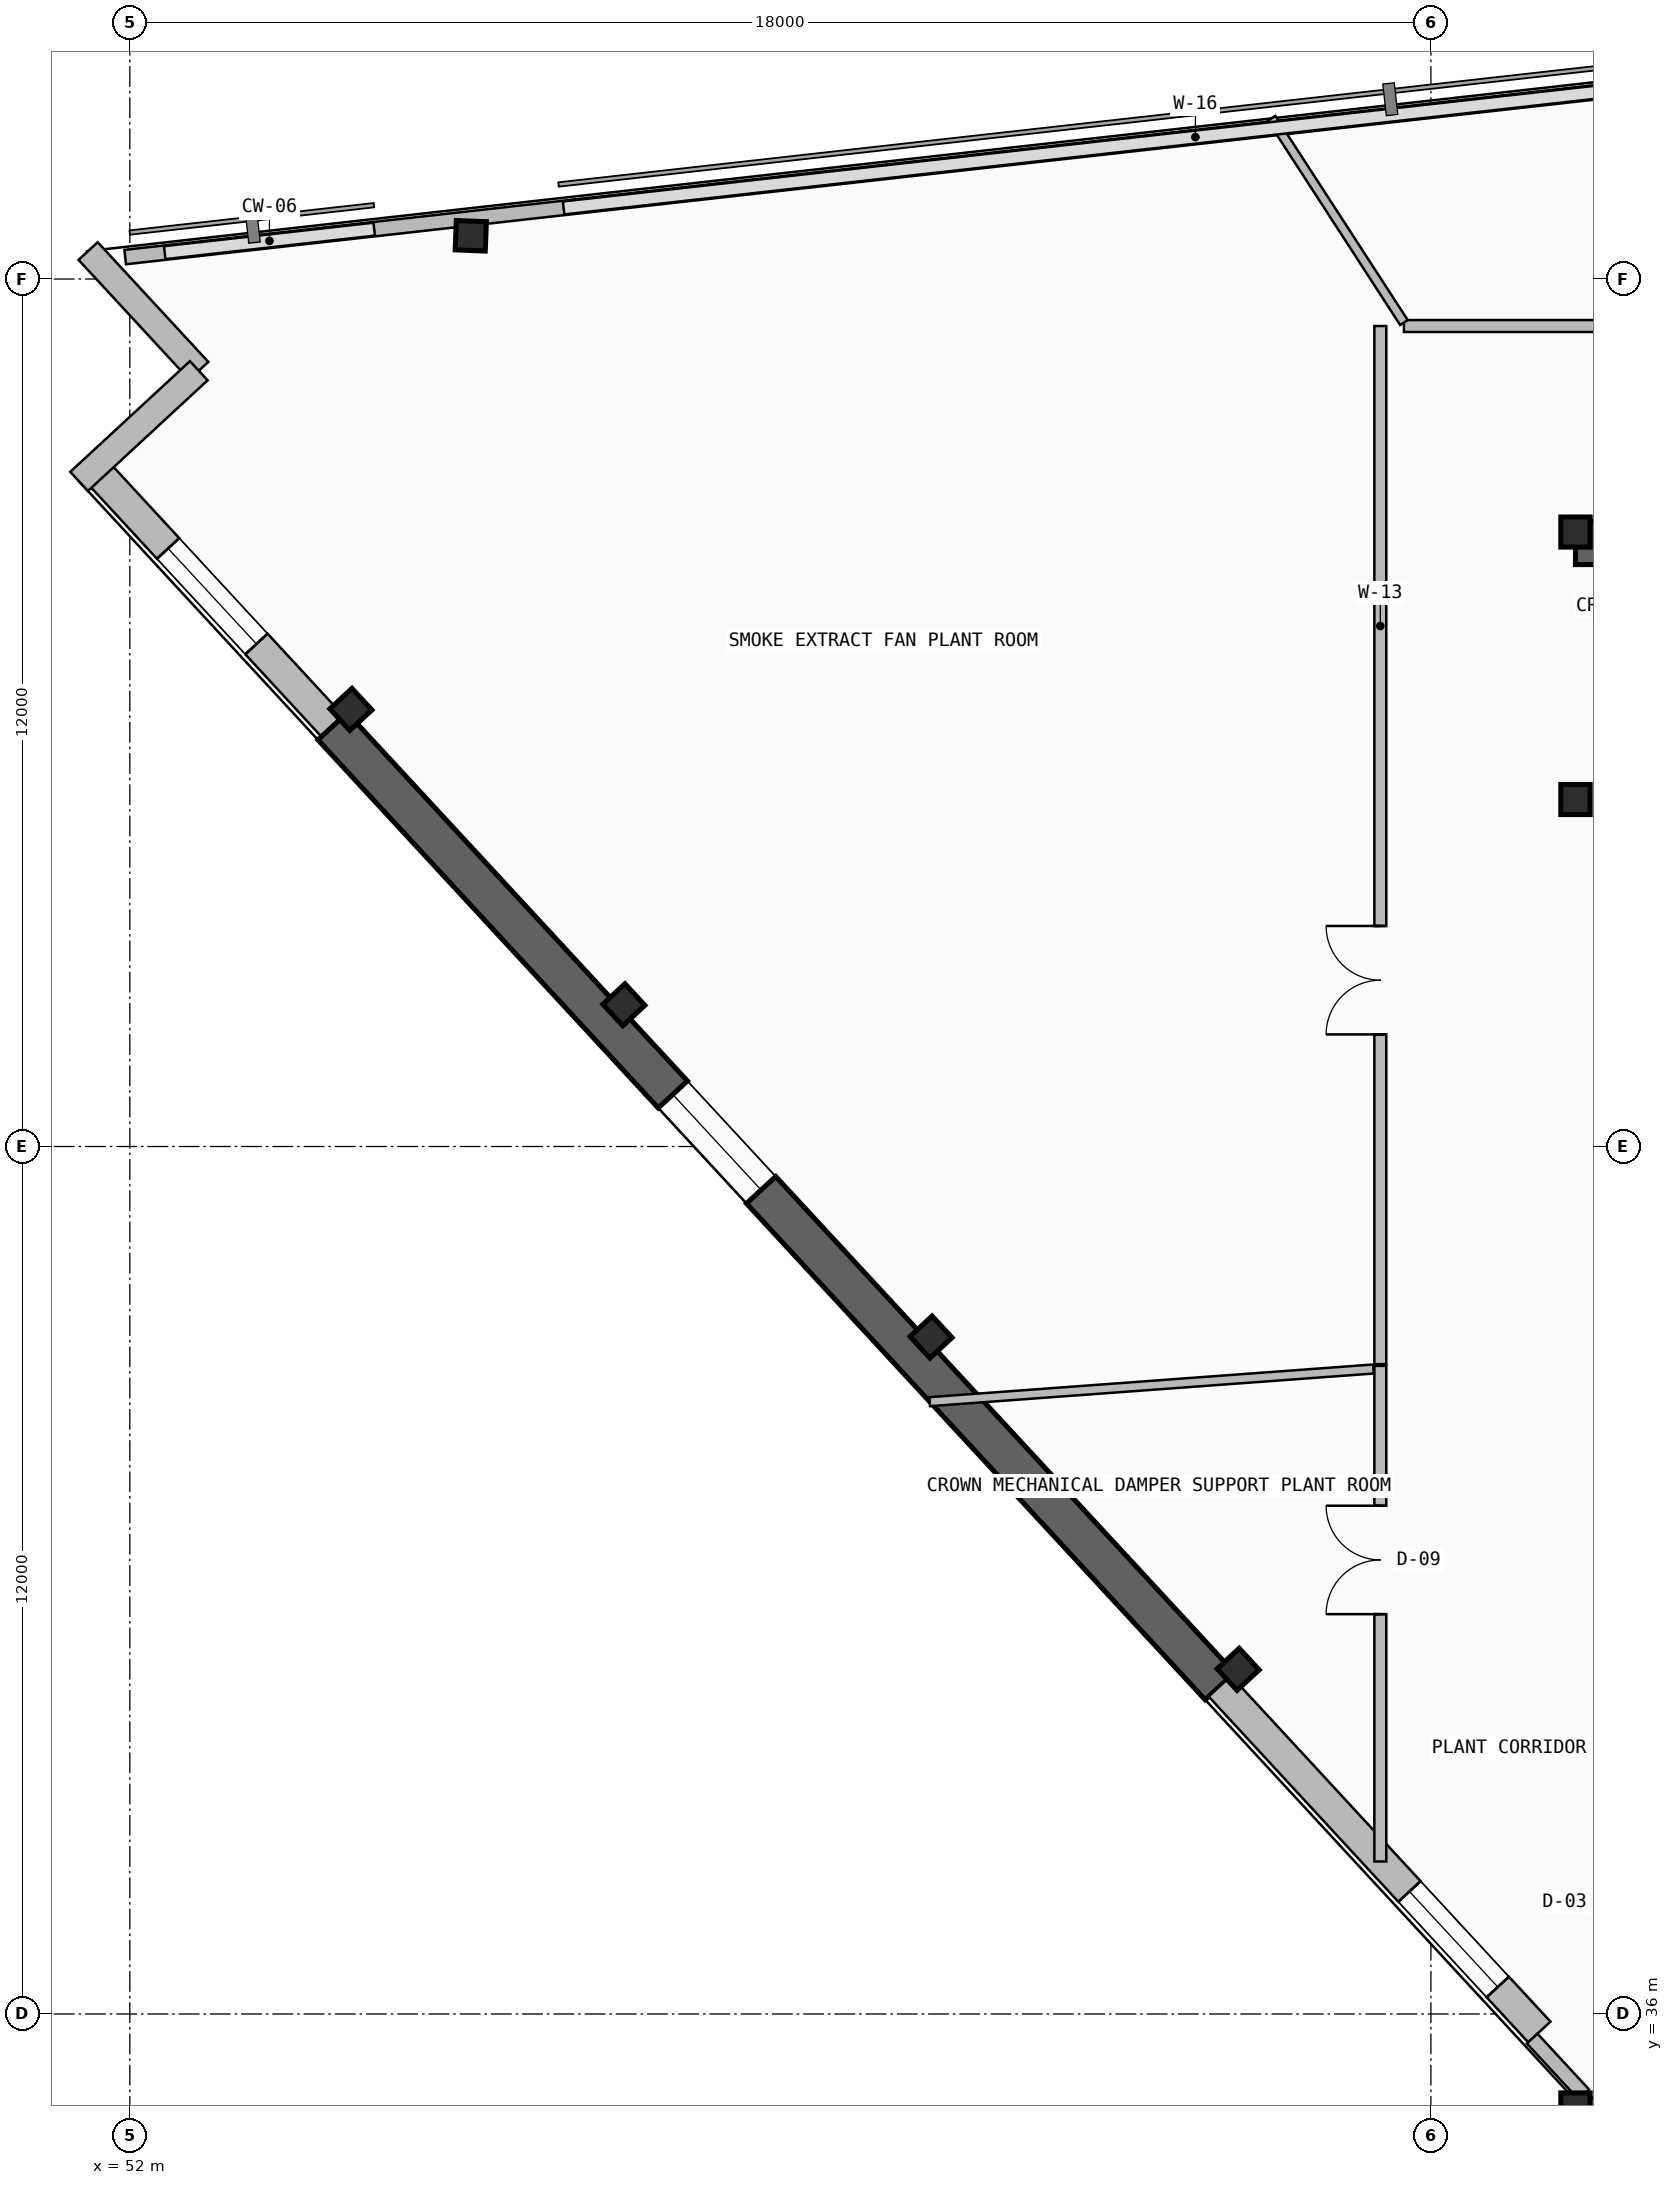
"""IFC4 building model, lengths in metres.
Left out: names, types, materials, properties, quantities, classifications, styles, units other than length and angle.
Written with IfcOpenShell. Run it as: python <this file> out.ifc"""

import sys

from ifc_helpers import new_model, si_unit, direction, frame, frame_2d, origin, origin_2d, place, context, subcontext, project, spatial, polyline, rectangle, i_section, outline, extrude, element, fill, save


model = new_model("IFC4")
c1 = context("Model", 3, precision=1e-05, world=origin(), true_north=direction((0.0, 1.0)))
c2 = subcontext(c1, "Body", "Model", "MODEL_VIEW")
j1 = project(units=[si_unit("LENGTHUNIT", "METRE"), si_unit("PLANEANGLEUNIT", "RADIAN")], contexts=[c1])
p1 = place(None, origin())
s1 = spatial("IfcSite", under=j1, at=p1, CompositionType="ELEMENT")
p2 = place(p1, origin())
s2 = spatial("IfcBuilding", under=s1, at=p2, CompositionType="ELEMENT")
p3 = place(p2, frame((0.0, 0.0, 302.98)))
s3 = spatial("IfcBuildingStorey", under=s2, at=p3, CompositionType="ELEMENT", Elevation=302.98)
p4 = place(p3, frame((72.0, 56.35, -0.2), z_axis=(0.0, 0.0, 1.0), x_axis=(1.0, 0.0, 0.0)))
e1 = element("IfcWall", 1, at=p4, inside=s3, PredefinedType="SHEAR", context=c2, shape_type="SweptSolid", body=[
    extrude(rectangle(XDim=13.6, YDim=0.6, at=frame_2d((6.8, 0.0))), origin(), (0.0, 0.0, 1.0), 4.8),
])
for number, where, z_axis, x_axis in (
    (2, (72.0, 34.7, 0.0), (0.0, 0.0, 1.0), (1.0, 0.0, 0.0)),
    (3, (72.0, 52.8, 0.0), (0.0, 0.0, 1.0), (1.0, 0.0, 0.0)),
    (4, (72.0, 56.5, 0.0), (0.0, 0.0, 1.0), (1.0, 0.0, 0.0)),
    (5, (56.717, 60.598, 0.0), (0.0, 0.0, 1.0), (0.039, 0.999, 0.0)),
    (6, (55.058, 54.046, 0.0), (0.0, 0.0, 1.0), (-0.679, 0.734, 0.0)),
    (7, (58.835, 49.961, 0.0), (0.0, 0.0, 1.0), (-0.679, 0.734, 0.0)),
    (8, (63.084, 45.364, 0.0), (0.0, 0.0, 1.0), (-0.679, 0.734, 0.0)),
    (9, (67.333, 40.768, 0.0), (0.0, 0.0, 1.0), (-0.679, 0.734, 0.0)),
):
    element("IfcColumn", number, at=place(p3, frame(where, z_axis=z_axis, x_axis=x_axis)), inside=s3, PredefinedType="COLUMN", context=c2, shape_type="SweptSolid", body=[
        extrude(i_section(OverallWidth=0.406, OverallDepth=0.416, WebThickness=0.03, FlangeThickness=0.048, FilletRadius=0.015, at=origin_2d()), origin(), (0.0, 0.0, 1.0), 4.8),
    ])
p5 = place(p3, frame((51.5, 57.387, 0.0), z_axis=(0.0, 0.0, 1.0), x_axis=(0.67880684669, -0.734316869537, 0.0)))
e10 = element("IfcWall", 10, at=p5, inside=s3, PredefinedType="SOLIDWALL", context=c2, shape_type="SweptSolid", body=[
    extrude(outline(polyline([(0.0, 0.0), (4.869, 0.0), (4.868, 4.6), (0.0, 4.6), (0.0, 0.0)])), frame((0.0, 0.21, 0.0), z_axis=(0.0, -1.0, 0.0), x_axis=(1.0, 0.0, 0.0)), (0.0, 0.0, 1.0), 0.42),
])
p6 = place(p5, frame((1.517, 0.0, 0.7)))
e11 = element("IfcOpeningElement", 11, at=p6, cuts=e10, PredefinedType="OPENING", context=c2, shape_type="SweptSolid", body=[
    extrude(rectangle(XDim=1.8, YDim=1.2, at=frame_2d((0.9, 0.6))), frame((0.0, 0.22, 0.0), z_axis=(0.0, -1.0, 0.0), x_axis=(1.0, 0.0, 0.0)), (0.0, 0.0, 1.0), 0.44),
])
p7 = place(p3, frame((54.805, 53.812, -0.2), z_axis=(0.0, 0.0, 1.0), x_axis=(0.678803115619, -0.734320318543, 0.0)))
e12 = element("IfcWall", 12, at=p7, inside=s3, PredefinedType="SHEAR", context=c2, shape_type="SweptSolid", body=[
    extrude(outline(polyline([(0.0, 0.0), (18.083, 0.0), (18.083, 4.8), (0.0, 4.8), (0.0, 0.0)])), frame((0.0, 0.275, 0.0), z_axis=(0.0, -1.0, 0.0), x_axis=(1.0, 0.0, 0.0)), (0.0, 0.0, 1.0), 0.55),
])
p8 = place(p7, frame((6.934, 0.0, 0.7)))
e13 = element("IfcOpeningElement", 13, at=p8, cuts=e12, PredefinedType="OPENING", context=c2, shape_type="SweptSolid", body=[
    extrude(rectangle(XDim=1.8, YDim=1.2, at=frame_2d((0.9, 0.6))), frame((0.0, 0.285, 0.0), z_axis=(0.0, -1.0, 0.0), x_axis=(1.0, 0.0, 0.0)), (0.0, 0.0, 1.0), 0.57),
])
p9 = place(p3, frame((67.08, 40.533, 0.0), z_axis=(0.0, 0.0, 1.0), x_axis=(0.678800006437, -0.734323192648, 0.0)))
e14 = element("IfcWall", 14, at=p9, inside=s3, PredefinedType="SOLIDWALL", context=c2, shape_type="SweptSolid", body=[
    extrude(outline(polyline([(0.0, 0.0), (6.512, 0.0), (6.512, 4.6), (0.0, 4.6), (0.0, 0.0)])), frame((0.0, 0.21, 0.0), z_axis=(0.0, -1.0, 0.0), x_axis=(1.0, 0.0, 0.0)), (0.0, 0.0, 1.0), 0.42),
])
p10 = place(p9, frame((3.865, 0.0, 0.7)))
e15 = element("IfcOpeningElement", 15, at=p10, cuts=e14, PredefinedType="OPENING", context=c2, shape_type="SweptSolid", body=[
    extrude(rectangle(XDim=1.8, YDim=1.2, at=frame_2d((0.9, 0.6))), frame((0.0, 0.22, 0.0), z_axis=(0.0, -1.0, 0.0), x_axis=(1.0, 0.0, 0.0)), (0.0, 0.0, 1.0), 0.44),
])
for number, where, z_axis, x_axis in (
    (16, (51.423, 60.387, 0.0), (0.0, 0.0, 1.0), (0.679, -0.734, 0.0)),
    (17, (52.954, 58.731, 0.0), (0.0, 0.0, 1.0), (-0.734, -0.679, 0.0)),
):
    element("IfcWall", number, at=place(p3, frame(where, z_axis=z_axis, x_axis=x_axis)), inside=s3, PredefinedType="SOLIDWALL", context=c2, shape_type="SweptSolid", body=[
        extrude(rectangle(XDim=2.255, YDim=0.36, at=frame_2d((1.127, 0.0))), origin(), (0.0, 0.0, 1.0), 4.6),
    ])
p11 = place(p3, frame((72.881, 34.058, 0.0), z_axis=(0.0, 0.0, 1.0), x_axis=(-0.678872530156, 0.734256145905, 0.0)))
e18 = element("IfcWall", 18, at=p11, inside=s3, PredefinedType="PARAPET", context=c2, shape_type="SweptSolid", body=[
    extrude(rectangle(XDim=1.01, YDim=0.2, at=frame_2d((0.505, 0.0))), origin(), (0.0, 0.0, 1.0), 1.15),
])
p12 = place(p3, frame((72.115, 34.887, 0.0), z_axis=(0.0, 0.0, 1.0), x_axis=(-0.678713667452, 0.734402994012, 0.0)))
e19 = element("IfcWall", 19, at=p12, inside=s3, PredefinedType="PARAPET", context=c2, shape_type="SweptSolid", body=[
    extrude(rectangle(XDim=1.052, YDim=0.2, at=frame_2d((0.526, 0.0))), origin(), (0.0, 0.0, 1.0), 1.15),
])
p13 = place(p3, frame((51.936, 60.304, 0.0), z_axis=(0.0, 0.0, 1.0), x_axis=(0.993776757355, 0.111390109707, 0.0)))
e20 = element("IfcWall", 20, at=p13, inside=s3, PredefinedType="PARAPET", context=c2, shape_type="SweptSolid", body=[
    extrude(rectangle(XDim=29.797, YDim=0.2, at=frame_2d((14.898, 0.0))), origin(), (0.0, 0.0, 1.0), 1.15),
])
p14 = place(p3, frame((69.3, 44.965, 0.0), z_axis=(0.0, 0.0, 1.0), x_axis=(0.0, -1.0, 0.0)))
e21 = element("IfcWall", 21, at=p14, inside=s3, PredefinedType="PARTITIONING", context=c2, shape_type="SweptSolid", body=[
    extrude(rectangle(XDim=6.856, YDim=0.165, at=frame_2d((3.428, 0.0))), origin(), (0.0, 0.0, 1.0), 4.6),
])
p15 = place(p14, frame((1.935, 0.0, 0.0)))
e22 = element("IfcOpeningElement", 22, at=p15, cuts=e21, PredefinedType="OPENING", context=c2, shape_type="SweptSolid", body=[
    extrude(rectangle(XDim=1.5, YDim=2.25, at=frame_2d((0.75, 1.125))), frame((0.0, 0.093, 0.0), z_axis=(0.0, -1.0, 0.0), x_axis=(1.0, 0.0, 0.0)), (0.0, 0.0, 1.0), 0.185),
])
p16 = place(p3, frame((63.066, 44.47, 0.0), z_axis=(0.0, 0.0, 1.0), x_axis=(0.997302163141, 0.073405690471, 0.0)))
e23 = element("IfcWall", 23, at=p16, inside=s3, PredefinedType="PARTITIONING", context=c2, shape_type="SweptSolid", body=[
    extrude(rectangle(XDim=6.156, YDim=0.125, at=frame_2d((3.078, 0.0))), origin(), (0.0, 0.0, 1.0), 3.985),
])
p17 = place(p3, frame((85.567, 59.35, 0.0), z_axis=(0.0, 0.0, 1.0), x_axis=(-1.0, 0.0, 0.0)))
e24 = element("IfcWall", 24, at=p17, inside=s3, PredefinedType="PARTITIONING", context=c2, shape_type="SweptSolid", body=[
    extrude(rectangle(XDim=15.94, YDim=0.165, at=frame_2d((7.97, 0.0))), origin(), (0.0, 0.0, 1.0), 4.6),
])
p18 = place(p17, frame((7.22, 0.0, 0.0)))
e25 = element("IfcOpeningElement", 25, at=p18, cuts=e24, PredefinedType="OPENING", context=c2, shape_type="SweptSolid", body=[
    extrude(rectangle(XDim=1.5, YDim=2.25, at=frame_2d((0.75, 1.125))), frame((0.0, 0.093, 0.0), z_axis=(0.0, -1.0, 0.0), x_axis=(1.0, 0.0, 0.0)), (0.0, 0.0, 1.0), 0.185),
])
p19 = place(p3, frame((69.627, 59.398, 0.0), z_axis=(0.0, 0.0, 1.0), x_axis=(-0.544077969561, 0.839034661404, 0.0)))
e26 = element("IfcWall", 26, at=p19, inside=s3, PredefinedType="PARTITIONING", context=c2, shape_type="SweptSolid", body=[
    extrude(rectangle(XDim=3.366, YDim=0.125, at=frame_2d((1.683, 0.0))), origin(), (0.0, 0.0, 1.0), 4.6),
])
p20 = place(p3, frame((69.3, 59.35, 0.0), z_axis=(0.0, 0.0, 1.0), x_axis=(0.0, -1.0, 0.0)))
e27 = element("IfcWall", 27, at=p20, inside=s3, PredefinedType="PARTITIONING", context=c2, shape_type="SweptSolid", body=[
    extrude(rectangle(XDim=14.361, YDim=0.165, at=frame_2d((7.18, 0.0))), origin(), (0.0, 0.0, 1.0), 4.085),
])
p21 = place(p20, frame((8.299, 0.0, 0.0)))
e28 = element("IfcOpeningElement", 28, at=p21, cuts=e27, PredefinedType="OPENING", context=c2, shape_type="SweptSolid", body=[
    extrude(rectangle(XDim=1.5, YDim=2.25, at=frame_2d((0.75, 1.125))), frame((0.0, 0.093, 0.0), z_axis=(0.0, -1.0, 0.0), x_axis=(1.0, 0.0, 0.0)), (0.0, 0.0, 1.0), 0.185),
])
p22 = place(p6, origin())
e29 = element("IfcWindow", 29, at=p22, inside=s3, PartitioningType="SINGLE_PANEL", PredefinedType="WINDOW", context=c2, shape_type="SweptSolid", body=[
    extrude(rectangle(XDim=1.8, YDim=1.2, at=frame_2d((0.9, 0.6))), frame((0.0, 0.03, 0.0), z_axis=(0.0, -1.0, 0.0), x_axis=(1.0, 0.0, 0.0)), (0.0, 0.0, 1.0), 0.06),
])
fill(e11, e29)
p23 = place(p8, origin())
e30 = element("IfcWindow", 30, at=p23, inside=s3, PartitioningType="SINGLE_PANEL", PredefinedType="WINDOW", context=c2, shape_type="SweptSolid", body=[
    extrude(rectangle(XDim=1.8, YDim=1.2, at=frame_2d((0.9, 0.6))), frame((0.0, 0.03, 0.0), z_axis=(0.0, -1.0, 0.0), x_axis=(1.0, 0.0, 0.0)), (0.0, 0.0, 1.0), 0.06),
])
fill(e13, e30)
p24 = place(p10, origin())
e31 = element("IfcWindow", 31, at=p24, inside=s3, PartitioningType="SINGLE_PANEL", PredefinedType="WINDOW", context=c2, shape_type="SweptSolid", body=[
    extrude(rectangle(XDim=1.8, YDim=1.2, at=frame_2d((0.9, 0.6))), frame((0.0, 0.03, 0.0), z_axis=(0.0, -1.0, 0.0), x_axis=(1.0, 0.0, 0.0)), (0.0, 0.0, 1.0), 0.06),
])
fill(e15, e31)
p25 = place(p15, frame((1.5, 0.0, 0.0), z_axis=(0.0, 0.0, 1.0), x_axis=(-1.0, 0.0, 0.0)))
e32 = element("IfcDoor", 32, at=p25, inside=s3, OperationType="DOUBLE_DOOR_SINGLE_SWING", PredefinedType="DOOR", context=c2, shape_type="SweptSolid", body=[
    extrude(rectangle(XDim=1.5, YDim=2.25, at=frame_2d((0.75, 1.125))), frame((0.0, 0.025, 0.0), z_axis=(0.0, -1.0, 0.0), x_axis=(1.0, 0.0, 0.0)), (0.0, 0.0, 1.0), 0.05),
])
fill(e22, e32)
p26 = place(p21, frame((1.5, 0.0, 0.0), z_axis=(0.0, 0.0, 1.0), x_axis=(-1.0, 0.0, 0.0)))
e33 = element("IfcDoor", 33, at=p26, inside=s3, OperationType="DOUBLE_DOOR_SINGLE_SWING", PredefinedType="DOOR", context=c2, shape_type="SweptSolid", body=[
    extrude(rectangle(XDim=1.5, YDim=2.25, at=frame_2d((0.75, 1.125))), frame((0.0, 0.025, 0.0), z_axis=(0.0, -1.0, 0.0), x_axis=(1.0, 0.0, 0.0)), (0.0, 0.0, 1.0), 0.05),
])
fill(e28, e33)
save(model, sys.argv[1])
